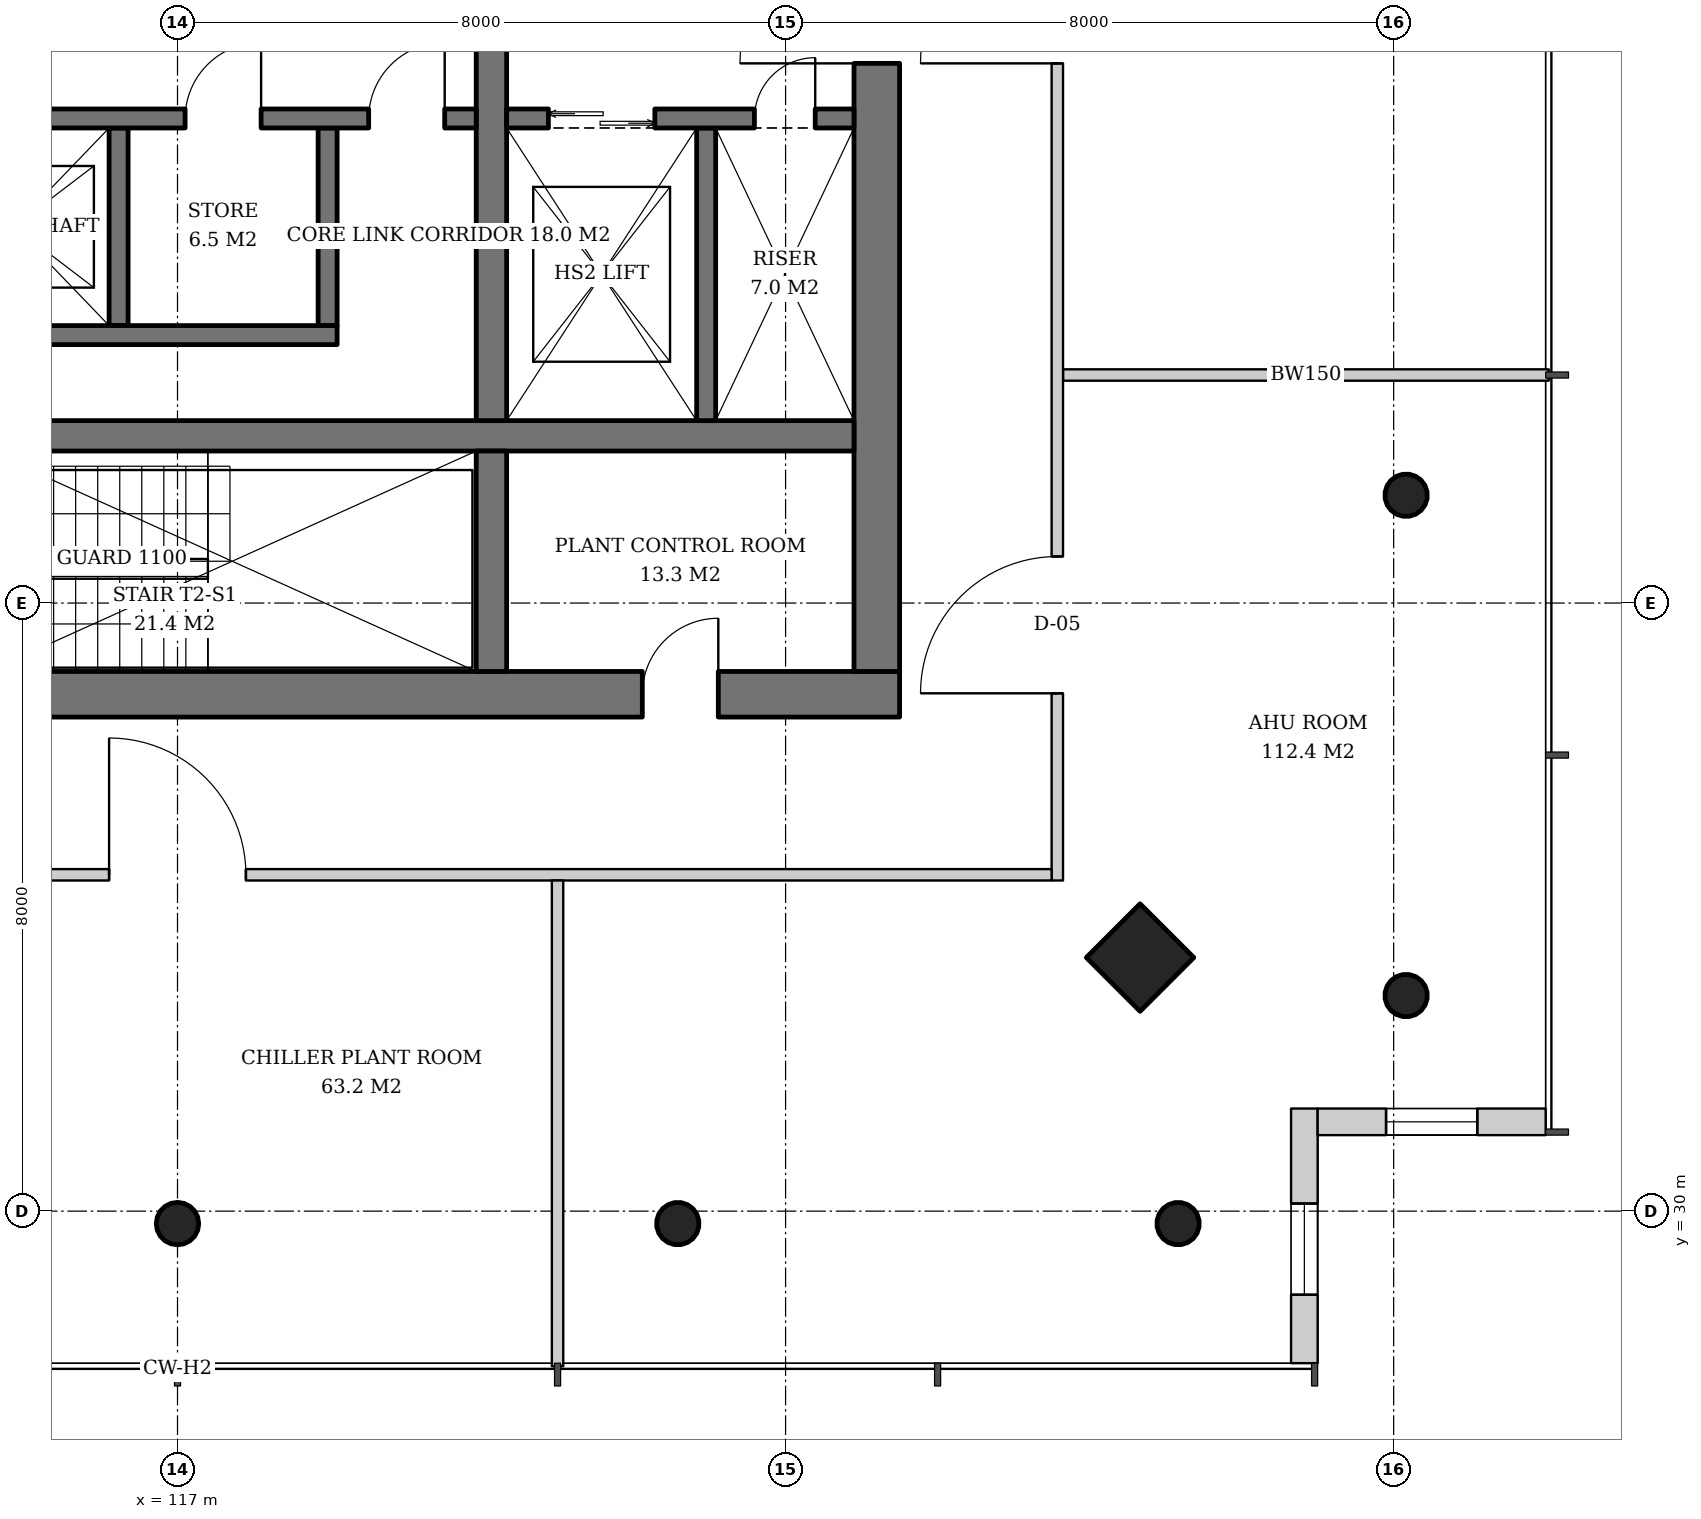
"""IFC4 building model, lengths in metres.
Left out: names, types, materials, properties, quantities, classifications, styles, units other than length and angle.
Written with IfcOpenShell. Run it as: python <this file> out.ifc"""

import sys

from ifc_helpers import new_model, si_unit, direction, frame, frame_2d, origin, origin_2d, place, context, subcontext, project, spatial, rectangle, hollow_circle, extrude, element, fill, save


model = new_model("IFC4")
c1 = context("Model", 3, precision=1e-05, world=origin(), true_north=direction((0.0, 1.0)))
c2 = subcontext(c1, "Body", "Model", "MODEL_VIEW")
j1 = project(units=[si_unit("LENGTHUNIT", "METRE"), si_unit("PLANEANGLEUNIT", "RADIAN")], contexts=[c1])
p1 = place(None, origin())
s1 = spatial("IfcSite", under=j1, at=p1, CompositionType="ELEMENT")
p2 = place(p1, origin())
s2 = spatial("IfcBuilding", under=s1, at=p2, CompositionType="ELEMENT")
p3 = place(p2, frame((0.0, 0.0, 85.6)))
s3 = spatial("IfcBuildingStorey", under=s2, at=p3, CompositionType="ELEMENT", Elevation=85.6)
p4 = place(p3, frame((133.216, 32.784, 0.0), z_axis=(-0.043032401563, 0.043032401563, 0.998146494675), x_axis=(-0.707106781187, -0.707106781187, 0.0)))
e1 = element("IfcColumn", 1, at=p4, inside=s3, PredefinedType="COLUMN", context=c2, shape_type="SweptSolid", body=[
    extrude(hollow_circle(Radius=0.28, WallThickness=0.02, at=origin_2d()), origin(), (0.0, 0.0, 1.0), 3.807),
])
p5 = place(p3, frame((133.216, 39.392, 0.0), z_axis=(-0.04306234503, 0.02149908433, 0.998841040313), x_axis=(-0.446680166538, -0.894693706707, 0.0)))
e2 = element("IfcColumn", 2, at=p5, inside=s3, PredefinedType="COLUMN", context=c2, shape_type="SweptSolid", body=[
    extrude(hollow_circle(Radius=0.28, WallThickness=0.02, at=origin_2d()), origin(), (0.0, 0.0, 1.0), 3.804),
])
p6 = place(p3, frame((129.716, 33.284, 0.0), z_axis=(-0.043032401563, 0.043032401563, 0.998146494675), x_axis=(-0.707106781187, -0.707106781187, 0.0)))
e3 = element("IfcColumn", 3, at=p6, inside=s3, PredefinedType="COLUMN", context=c2, shape_type="SweptSolid", body=[
    extrude(rectangle(XDim=1.0, YDim=1.0, at=origin_2d()), origin(), (0.0, 0.0, 1.0), 3.807),
])
p7 = place(p3, frame((130.216, 29.784, 0.0), z_axis=(-0.043032401563, 0.043032401563, 0.998146494675), x_axis=(-0.707106781187, -0.707106781187, 0.0)))
e4 = element("IfcColumn", 4, at=p7, inside=s3, PredefinedType="COLUMN", context=c2, shape_type="SweptSolid", body=[
    extrude(hollow_circle(Radius=0.28, WallThickness=0.02, at=origin_2d()), origin(), (0.0, 0.0, 1.0), 3.807),
])
p8 = place(p3, frame((117.0, 29.784, 0.0), z_axis=(0.0, 0.043072300418, 0.999071957837), x_axis=(-1.0, 0.0, 0.0)))
e5 = element("IfcColumn", 5, at=p8, inside=s3, PredefinedType="COLUMN", context=c2, shape_type="SweptSolid", body=[
    extrude(hollow_circle(Radius=0.28, WallThickness=0.02, at=origin_2d()), origin(), (0.0, 0.0, 1.0), 3.803),
])
p9 = place(p3, frame((123.608, 29.784, 0.0), z_axis=(-0.02149908433, 0.04306234503, 0.998841040313), x_axis=(-0.894693706707, -0.446680166538, 0.0)))
e6 = element("IfcColumn", 6, at=p9, inside=s3, PredefinedType="COLUMN", context=c2, shape_type="SweptSolid", body=[
    extrude(hollow_circle(Radius=0.28, WallThickness=0.02, at=origin_2d()), origin(), (0.0, 0.0, 1.0), 3.804),
])
p10 = place(p3, frame((107.5, 36.8, 0.0), z_axis=(0.0, 0.0, 1.0), x_axis=(1.0, 0.0, 0.0)))
e7 = element("IfcWall", 7, at=p10, inside=s3, PredefinedType="SHEAR", context=c2, shape_type="SweptSolid", body=[
    extrude(rectangle(XDim=19.0, YDim=0.6, at=frame_2d((9.5, 0.0))), origin(), (0.0, 0.0, 1.0), 3.8),
])
p11 = place(p10, frame((3.9, 0.0, 0.0)))
e8 = element("IfcOpeningElement", 8, at=p11, cuts=e7, PredefinedType="OPENING", context=c2, shape_type="SweptSolid", body=[
    extrude(rectangle(XDim=1.0, YDim=2.1, at=frame_2d((0.5, 1.05))), frame((0.0, 0.31, 0.0), z_axis=(0.0, -1.0, 0.0), x_axis=(1.0, 0.0, 0.0)), (0.0, 0.0, 1.0), 0.62),
])
p12 = place(p10, frame((15.615, 0.0, 0.0)))
e9 = element("IfcOpeningElement", 9, at=p12, cuts=e7, PredefinedType="OPENING", context=c2, shape_type="SweptSolid", body=[
    extrude(rectangle(XDim=1.0, YDim=2.1, at=frame_2d((0.5, 1.05))), frame((0.0, 0.31, 0.0), z_axis=(0.0, -1.0, 0.0), x_axis=(1.0, 0.0, 0.0)), (0.0, 0.0, 1.0), 0.62),
])
p13 = place(p3, frame((126.2, 37.1, 0.0), z_axis=(0.0, 0.0, 1.0), x_axis=(0.0, 1.0, 0.0)))
e10 = element("IfcWall", 10, at=p13, inside=s3, PredefinedType="SHEAR", context=c2, shape_type="SweptSolid", body=[
    extrude(rectangle(XDim=17.8, YDim=0.6, at=frame_2d((8.9, 0.0))), origin(), (0.0, 0.0, 1.0), 3.8),
])
p14 = place(p13, frame((8.0, 0.0, 0.0)))
e11 = element("IfcOpeningElement", 11, at=p14, cuts=e10, PredefinedType="OPENING", context=c2, shape_type="SweptSolid", body=[
    extrude(rectangle(XDim=1.8, YDim=2.4, at=frame_2d((0.9, 1.2))), frame((0.0, 0.31, 0.0), z_axis=(0.0, -1.0, 0.0), x_axis=(1.0, 0.0, 0.0)), (0.0, 0.0, 1.0), 0.62),
])
p15 = place(p3, frame((108.1, 40.2, 0.0), z_axis=(0.0, 0.0, 1.0), x_axis=(1.0, 0.0, 0.0)))
e12 = element("IfcWall", 12, at=p15, inside=s3, PredefinedType="SHEAR", context=c2, shape_type="SweptSolid", body=[
    extrude(rectangle(XDim=17.8, YDim=0.4, at=frame_2d((8.9, 0.0))), origin(), (0.0, 0.0, 1.0), 3.8),
])
p16 = place(p15, frame((3.3, 0.0, 0.0)))
e13 = element("IfcOpeningElement", 13, at=p16, cuts=e12, PredefinedType="OPENING", context=c2, shape_type="SweptSolid", body=[
    extrude(rectangle(XDim=1.0, YDim=2.1, at=frame_2d((0.5, 1.05))), frame((0.0, 0.21, 0.0), z_axis=(0.0, -1.0, 0.0), x_axis=(1.0, 0.0, 0.0)), (0.0, 0.0, 1.0), 0.42),
])
p17 = place(p3, frame((121.13, 37.1, 0.0), z_axis=(0.0, 0.0, 1.0), x_axis=(0.0, 1.0, 0.0)))
e14 = element("IfcWall", 14, at=p17, inside=s3, PredefinedType="SHEAR", context=c2, shape_type="SweptSolid", body=[
    extrude(rectangle(XDim=2.9, YDim=0.4, at=frame_2d((1.45, 0.0))), origin(), (0.0, 0.0, 1.0), 3.8),
])
p18 = place(p3, frame((121.13, 40.4, 0.0), z_axis=(0.0, 0.0, 1.0), x_axis=(0.0, 1.0, 0.0)))
e15 = element("IfcWall", 15, at=p18, inside=s3, PredefinedType="SHEAR", context=c2, shape_type="SweptSolid", body=[
    extrude(rectangle(XDim=11.2, YDim=0.4, at=frame_2d((5.6, 0.0))), origin(), (0.0, 0.0, 1.0), 3.8),
])
p19 = place(p18, frame((5.1, 0.0, 0.0)))
e16 = element("IfcOpeningElement", 16, at=p19, cuts=e15, PredefinedType="OPENING", context=c2, shape_type="SweptSolid", body=[
    extrude(rectangle(XDim=1.0, YDim=2.1, at=frame_2d((0.5, 1.05))), frame((0.0, 0.21, 0.0), z_axis=(0.0, -1.0, 0.0), x_axis=(1.0, 0.0, 0.0)), (0.0, 0.0, 1.0), 0.42),
])
p20 = place(p3, frame((131.825, 28.0, 0.0), z_axis=(0.0, 0.0, 1.0), x_axis=(0.0, 1.0, 0.0)))
e17 = element("IfcWall", 17, at=p20, inside=s3, PredefinedType="SOLIDWALL", context=c2, shape_type="SweptSolid", body=[
    extrude(rectangle(XDim=3.35, YDim=0.35, at=frame_2d((1.675, 0.0))), origin(), (0.0, 0.0, 1.0), 3.6),
])
p21 = place(p20, frame((0.9, 0.0, 0.6)))
e18 = element("IfcOpeningElement", 18, at=p21, cuts=e17, PredefinedType="OPENING", context=c2, shape_type="SweptSolid", body=[
    extrude(rectangle(XDim=1.2, YDim=2.55, at=frame_2d((0.6, 1.275))), frame((0.0, 0.185, 0.0), z_axis=(0.0, -1.0, 0.0), x_axis=(1.0, 0.0, 0.0)), (0.0, 0.0, 1.0), 0.37),
])
p22 = place(p3, frame((132.0, 31.175, 0.0), z_axis=(0.0, 0.0, 1.0), x_axis=(1.0, 0.0, 0.0)))
e19 = element("IfcWall", 19, at=p22, inside=s3, PredefinedType="SOLIDWALL", context=c2, shape_type="SweptSolid", body=[
    extrude(rectangle(XDim=3.0, YDim=0.35, at=frame_2d((1.5, 0.0))), origin(), (0.0, 0.0, 1.0), 3.6),
])
p23 = place(p22, frame((0.9, 0.0, 0.6)))
e20 = element("IfcOpeningElement", 20, at=p23, cuts=e19, PredefinedType="OPENING", context=c2, shape_type="SweptSolid", body=[
    extrude(rectangle(XDim=1.2, YDim=2.55, at=frame_2d((0.6, 1.275))), frame((0.0, 0.185, 0.0), z_axis=(0.0, -1.0, 0.0), x_axis=(1.0, 0.0, 0.0)), (0.0, 0.0, 1.0), 0.37),
])
for number, where, z_axis, x_axis in (
    (21, (116.225, 44.25, 0.0), (0.0, 0.0, 1.0), (0.0, -1.0, 0.0)),
    (22, (118.975, 44.25, 0.0), (0.0, 0.0, 1.0), (0.0, -1.0, 0.0)),
):
    element("IfcWall", number, at=place(p3, frame(where, z_axis=z_axis, x_axis=x_axis)), inside=s3, PredefinedType="SHEAR", context=c2, shape_type="SweptSolid", body=[
        extrude(rectangle(XDim=2.6, YDim=0.25, at=frame_2d((1.3, 0.0))), origin(), (0.0, 0.0, 1.0), 3.8),
    ])
p24 = place(p3, frame((108.1, 41.525, 0.0), z_axis=(0.0, 0.0, 1.0), x_axis=(1.0, 0.0, 0.0)))
e23 = element("IfcWall", 23, at=p24, inside=s3, PredefinedType="SHEAR", context=c2, shape_type="SweptSolid", body=[
    extrude(rectangle(XDim=11.0, YDim=0.25, at=frame_2d((5.5, 0.0))), origin(), (0.0, 0.0, 1.0), 3.8),
])
p25 = place(p3, frame((108.1, 44.375, 0.0), z_axis=(0.0, 0.0, 1.0), x_axis=(1.0, 0.0, 0.0)))
e24 = element("IfcWall", 24, at=p25, inside=s3, PredefinedType="SHEAR", context=c2, shape_type="SweptSolid", body=[
    extrude(rectangle(XDim=12.83, YDim=0.25, at=frame_2d((6.415, 0.0))), origin(), (0.0, 0.0, 1.0), 3.8),
])
p26 = place(p25, frame((9.0, 0.0, 0.0)))
e25 = element("IfcOpeningElement", 25, at=p26, cuts=e24, PredefinedType="OPENING", context=c2, shape_type="SweptSolid", body=[
    extrude(rectangle(XDim=1.0, YDim=2.1, at=frame_2d((0.5, 1.05))), frame((0.0, 0.135, 0.0), z_axis=(0.0, -1.0, 0.0), x_axis=(1.0, 0.0, 0.0)), (0.0, 0.0, 1.0), 0.27),
])
p27 = place(p25, frame((11.415, 0.0, 0.0)))
e26 = element("IfcOpeningElement", 26, at=p27, cuts=e24, PredefinedType="OPENING", context=c2, shape_type="SweptSolid", body=[
    extrude(rectangle(XDim=1.0, YDim=2.1, at=frame_2d((0.5, 1.05))), frame((0.0, 0.135, 0.0), z_axis=(0.0, -1.0, 0.0), x_axis=(1.0, 0.0, 0.0)), (0.0, 0.0, 1.0), 0.27),
])
p28 = place(p3, frame((123.955, 44.25, 0.0), z_axis=(0.0, 0.0, 1.0), x_axis=(0.0, -1.0, 0.0)))
e27 = element("IfcWall", 27, at=p28, inside=s3, PredefinedType="SHEAR", context=c2, shape_type="SweptSolid", body=[
    extrude(rectangle(XDim=3.85, YDim=0.25, at=frame_2d((1.925, 0.0))), origin(), (0.0, 0.0, 1.0), 3.8),
])
p29 = place(p3, frame((121.33, 44.375, 0.0), z_axis=(0.0, 0.0, 1.0), x_axis=(1.0, 0.0, 0.0)))
e28 = element("IfcWall", 28, at=p29, inside=s3, PredefinedType="SHEAR", context=c2, shape_type="SweptSolid", body=[
    extrude(rectangle(XDim=4.57, YDim=0.25, at=frame_2d((2.285, 0.0))), origin(), (0.0, 0.0, 1.0), 3.8),
])
p30 = place(p29, frame((0.55, 0.0, 0.0)))
e29 = element("IfcOpeningElement", 29, at=p30, cuts=e28, PredefinedType="OPENING", context=c2, shape_type="SweptSolid", body=[
    extrude(rectangle(XDim=1.4, YDim=2.4, at=frame_2d((0.7, 1.2))), frame((0.0, 0.135, 0.0), z_axis=(0.0, -1.0, 0.0), x_axis=(1.0, 0.0, 0.0)), (0.0, 0.0, 1.0), 0.27),
])
p31 = place(p29, frame((3.26, 0.0, 0.0)))
e30 = element("IfcOpeningElement", 30, at=p31, cuts=e28, PredefinedType="OPENING", context=c2, shape_type="SweptSolid", body=[
    extrude(rectangle(XDim=0.8, YDim=2.0, at=frame_2d((0.4, 1.0))), frame((0.0, 0.135, 0.0), z_axis=(0.0, -1.0, 0.0), x_axis=(1.0, 0.0, 0.0)), (0.0, 0.0, 1.0), 0.27),
])
p32 = place(p3, frame((128.65, 41.0, 0.0), z_axis=(0.0, 0.0, 1.0), x_axis=(1.0, 0.0, 0.0)))
e31 = element("IfcWall", 31, at=p32, inside=s3, PredefinedType="SOLIDWALL", context=c2, shape_type="SweptSolid", body=[
    extrude(rectangle(XDim=6.39, YDim=0.15, at=frame_2d((3.195, 0.0))), origin(), (0.0, 0.0, 1.0), 3.0),
])
p33 = place(p3, frame((128.575, 34.35, 0.0), z_axis=(0.0, 0.0, 1.0), x_axis=(0.0, 1.0, 0.0)))
e32 = element("IfcWall", 32, at=p33, inside=s3, PredefinedType="SOLIDWALL", context=c2, shape_type="SweptSolid", body=[
    extrude(rectangle(XDim=23.15, YDim=0.15, at=frame_2d((11.575, 0.0))), origin(), (0.0, 0.0, 1.0), 2.9),
])
p34 = place(p33, frame((2.462, 0.0, 0.0)))
e33 = element("IfcOpeningElement", 33, at=p34, cuts=e32, PredefinedType="OPENING", context=c2, shape_type="SweptSolid", body=[
    extrude(rectangle(XDim=1.8, YDim=2.4, at=frame_2d((0.9, 1.2))), frame((0.0, 0.085, 0.0), z_axis=(0.0, -1.0, 0.0), x_axis=(1.0, 0.0, 0.0)), (0.0, 0.0, 1.0), 0.17),
])
p35 = place(p33, frame((10.75, 0.0, 0.0)))
e34 = element("IfcOpeningElement", 34, at=p35, cuts=e32, PredefinedType="OPENING", context=c2, shape_type="SweptSolid", body=[
    extrude(rectangle(XDim=1.8, YDim=2.4, at=frame_2d((0.9, 1.2))), frame((0.0, 0.085, 0.0), z_axis=(0.0, -1.0, 0.0), x_axis=(1.0, 0.0, 0.0)), (0.0, 0.0, 1.0), 0.17),
])
p36 = place(p3, frame((105.35, 34.425, 0.0), z_axis=(0.0, 0.0, 1.0), x_axis=(1.0, 0.0, 0.0)))
e35 = element("IfcWall", 35, at=p36, inside=s3, PredefinedType="SOLIDWALL", context=c2, shape_type="SweptSolid", body=[
    extrude(rectangle(XDim=23.15, YDim=0.15, at=frame_2d((11.575, 0.0))), origin(), (0.0, 0.0, 1.0), 2.9),
])
p37 = place(p36, frame((2.462, 0.0, 0.0)))
e36 = element("IfcOpeningElement", 36, at=p37, cuts=e35, PredefinedType="OPENING", context=c2, shape_type="SweptSolid", body=[
    extrude(rectangle(XDim=1.8, YDim=2.4, at=frame_2d((0.9, 1.2))), frame((0.0, 0.085, 0.0), z_axis=(0.0, -1.0, 0.0), x_axis=(1.0, 0.0, 0.0)), (0.0, 0.0, 1.0), 0.17),
])
p38 = place(p36, frame((10.75, 0.0, 0.0)))
e37 = element("IfcOpeningElement", 37, at=p38, cuts=e35, PredefinedType="OPENING", context=c2, shape_type="SweptSolid", body=[
    extrude(rectangle(XDim=1.8, YDim=2.4, at=frame_2d((0.9, 1.2))), frame((0.0, 0.085, 0.0), z_axis=(0.0, -1.0, 0.0), x_axis=(1.0, 0.0, 0.0)), (0.0, 0.0, 1.0), 0.17),
])
p39 = place(p3, frame((122.0, 34.35, 0.0), z_axis=(0.0, 0.0, 1.0), x_axis=(0.0, -1.0, 0.0)))
e38 = element("IfcWall", 38, at=p39, inside=s3, PredefinedType="SOLIDWALL", context=c2, shape_type="SweptSolid", body=[
    extrude(rectangle(XDim=6.39, YDim=0.15, at=frame_2d((3.195, 0.0))), origin(), (0.0, 0.0, 1.0), 3.2),
])
p40 = place(p21, origin())
e39 = element("IfcWindow", 39, at=p40, inside=s3, PartitioningType="SINGLE_PANEL", PredefinedType="USERDEFINED", context=c2, shape_type="SweptSolid", body=[
    extrude(rectangle(XDim=1.2, YDim=2.55, at=frame_2d((0.6, 1.275))), frame((0.0, 0.03, 0.0), z_axis=(0.0, -1.0, 0.0), x_axis=(1.0, 0.0, 0.0)), (0.0, 0.0, 1.0), 0.06),
])
fill(e18, e39)
p41 = place(p23, origin())
e40 = element("IfcWindow", 40, at=p41, inside=s3, PartitioningType="SINGLE_PANEL", PredefinedType="USERDEFINED", context=c2, shape_type="SweptSolid", body=[
    extrude(rectangle(XDim=1.2, YDim=2.55, at=frame_2d((0.6, 1.275))), frame((0.0, 0.03, 0.0), z_axis=(0.0, -1.0, 0.0), x_axis=(1.0, 0.0, 0.0)), (0.0, 0.0, 1.0), 0.06),
])
fill(e20, e40)
p42 = place(p26, origin())
e41 = element("IfcDoor", 41, at=p42, inside=s3, OperationType="SINGLE_SWING_RIGHT", PredefinedType="DOOR", context=c2, shape_type="SweptSolid", body=[
    extrude(rectangle(XDim=1.0, YDim=2.1, at=frame_2d((0.5, 1.05))), frame((0.0, 0.025, 0.0), z_axis=(0.0, -1.0, 0.0), x_axis=(1.0, 0.0, 0.0)), (0.0, 0.0, 1.0), 0.05),
])
fill(e25, e41)
p43 = place(p27, origin())
e42 = element("IfcDoor", 42, at=p43, inside=s3, OperationType="SINGLE_SWING_RIGHT", PredefinedType="DOOR", context=c2, shape_type="SweptSolid", body=[
    extrude(rectangle(XDim=1.0, YDim=2.1, at=frame_2d((0.5, 1.05))), frame((0.0, 0.025, 0.0), z_axis=(0.0, -1.0, 0.0), x_axis=(1.0, 0.0, 0.0)), (0.0, 0.0, 1.0), 0.05),
])
fill(e26, e42)
p44 = place(p30, origin())
e43 = element("IfcDoor", 43, at=p44, inside=s3, OperationType="DOUBLE_DOOR_SLIDING", PredefinedType="DOOR", context=c2, shape_type="SweptSolid", body=[
    extrude(rectangle(XDim=1.4, YDim=2.4, at=frame_2d((0.7, 1.2))), frame((0.0, 0.025, 0.0), z_axis=(0.0, -1.0, 0.0), x_axis=(1.0, 0.0, 0.0)), (0.0, 0.0, 1.0), 0.05),
])
fill(e29, e43)
p45 = place(p31, origin())
e44 = element("IfcDoor", 44, at=p45, inside=s3, OperationType="SINGLE_SWING_RIGHT", PredefinedType="DOOR", context=c2, shape_type="SweptSolid", body=[
    extrude(rectangle(XDim=0.8, YDim=2.0, at=frame_2d((0.4, 1.0))), frame((0.0, 0.025, 0.0), z_axis=(0.0, -1.0, 0.0), x_axis=(1.0, 0.0, 0.0)), (0.0, 0.0, 1.0), 0.05),
])
fill(e30, e44)
p46 = place(p14, origin())
e45 = element("IfcDoor", 45, at=p46, inside=s3, OperationType="DOUBLE_DOOR_SINGLE_SWING", PredefinedType="DOOR", context=c2, shape_type="SweptSolid", body=[
    extrude(rectangle(XDim=1.8, YDim=2.4, at=frame_2d((0.9, 1.2))), frame((0.0, 0.025, 0.0), z_axis=(0.0, -1.0, 0.0), x_axis=(1.0, 0.0, 0.0)), (0.0, 0.0, 1.0), 0.05),
])
fill(e11, e45)
p47 = place(p12, origin())
e46 = element("IfcDoor", 46, at=p47, inside=s3, OperationType="SINGLE_SWING_RIGHT", PredefinedType="DOOR", context=c2, shape_type="SweptSolid", body=[
    extrude(rectangle(XDim=1.0, YDim=2.1, at=frame_2d((0.5, 1.05))), frame((0.0, 0.29, 0.0), z_axis=(0.0, -1.0, 0.0), x_axis=(1.0, 0.0, 0.0)), (0.0, 0.0, 1.0), 0.05),
])
fill(e9, e46)
p48 = place(p34, origin())
e47 = element("IfcDoor", 47, at=p48, inside=s3, OperationType="DOUBLE_DOOR_SINGLE_SWING", PredefinedType="DOOR", context=c2, shape_type="SweptSolid", body=[
    extrude(rectangle(XDim=1.8, YDim=2.4, at=frame_2d((0.9, 1.2))), frame((0.0, 0.025, 0.0), z_axis=(0.0, -1.0, 0.0), x_axis=(1.0, 0.0, 0.0)), (0.0, 0.0, 1.0), 0.05),
])
fill(e33, e47)
p49 = place(p35, origin())
e48 = element("IfcDoor", 48, at=p49, inside=s3, OperationType="DOUBLE_DOOR_SINGLE_SWING", PredefinedType="DOOR", context=c2, shape_type="SweptSolid", body=[
    extrude(rectangle(XDim=1.8, YDim=2.4, at=frame_2d((0.9, 1.2))), frame((0.0, 0.025, 0.0), z_axis=(0.0, -1.0, 0.0), x_axis=(1.0, 0.0, 0.0)), (0.0, 0.0, 1.0), 0.05),
])
fill(e34, e48)
p50 = place(p38, origin())
e49 = element("IfcDoor", 49, at=p50, inside=s3, OperationType="DOUBLE_DOOR_SINGLE_SWING", PredefinedType="DOOR", context=c2, shape_type="SweptSolid", body=[
    extrude(rectangle(XDim=1.8, YDim=2.4, at=frame_2d((0.9, 1.2))), frame((0.0, 0.025, 0.0), z_axis=(0.0, -1.0, 0.0), x_axis=(1.0, 0.0, 0.0)), (0.0, 0.0, 1.0), 0.05),
])
fill(e37, e49)
save(model, sys.argv[1])
